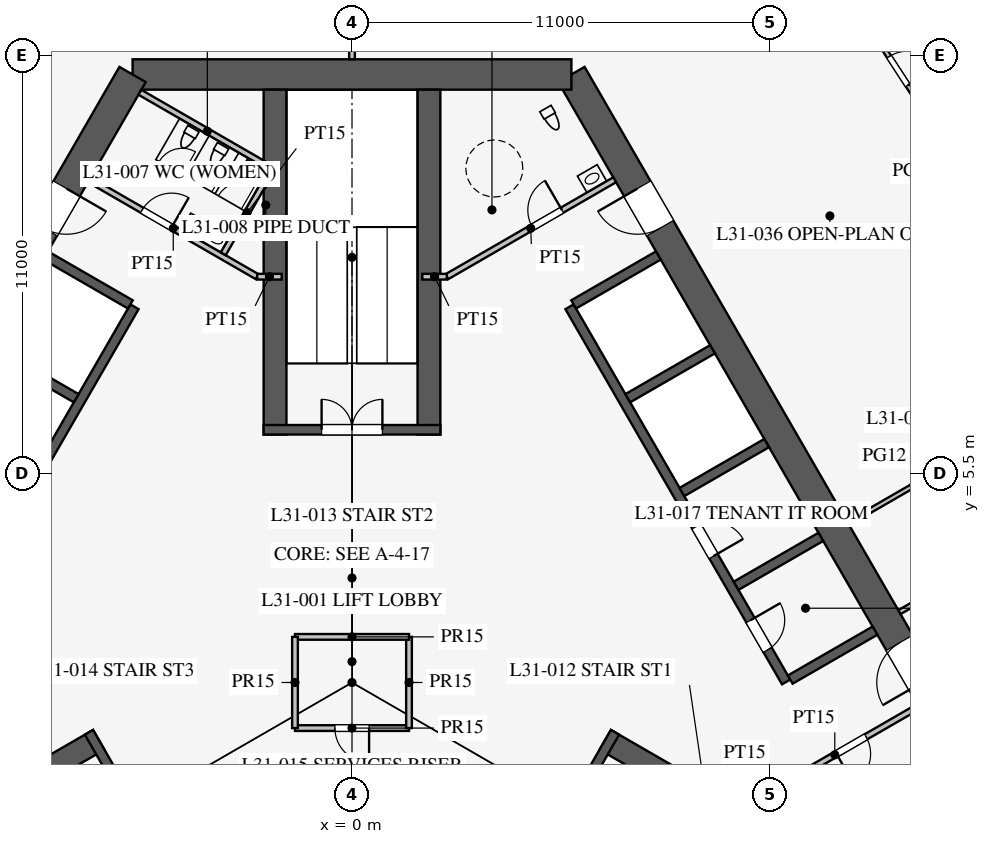
"""IFC4 building model, lengths in metres.
Left out: names, types, materials, properties, quantities, classifications, styles, units other than length and angle.
Written with IfcOpenShell. Run it as: python <this file> out.ifc"""

import sys

from ifc_helpers import new_model, si_unit, direction, frame, frame_2d, origin, place, context, subcontext, project, spatial, rectangle, extrude, element, fill, save


model = new_model("IFC4")
c1 = context("Model", 3, precision=1e-05, world=origin(), true_north=direction((0.0, 1.0)))
c2 = subcontext(c1, "Body", "Model", "MODEL_VIEW")
j1 = project(units=[si_unit("LENGTHUNIT", "METRE"), si_unit("PLANEANGLEUNIT", "RADIAN")], contexts=[c1])
p1 = place(None, origin())
s1 = spatial("IfcSite", under=j1, at=p1, CompositionType="ELEMENT")
p2 = place(p1, origin())
s2 = spatial("IfcBuilding", under=s1, at=p2, CompositionType="ELEMENT")
p3 = place(p2, frame((0.0, 0.0, 136.7)))
s3 = spatial("IfcBuildingStorey", under=s2, at=p3, CompositionType="ELEMENT", Elevation=136.7)
p4 = place(p3, frame((16.743, -3.0, 0.0), z_axis=(0.0, 0.0, 1.0), x_axis=(-0.500002442456, 0.866023993627, 0.0)))
e1 = element("IfcWall", 1, at=p4, inside=s3, PredefinedType="SHEAR", context=c2, shape_type="SweptSolid", body=[
    extrude(rectangle(XDim=21.939, YDim=0.8, at=frame_2d((10.97, 0.0))), origin(), (0.0, 0.0, 1.0), 4.2),
])
p5 = place(p4, frame((17.27, 0.0, 0.0)))
e2 = element("IfcOpeningElement", 2, at=p5, cuts=e1, PredefinedType="OPENING", context=c2, shape_type="SweptSolid", body=[
    extrude(rectangle(XDim=1.2, YDim=2.1, at=frame_2d((0.6, 1.05))), frame((0.0, 0.41, 0.0), z_axis=(0.0, -1.0, 0.0), x_axis=(1.0, 0.0, 0.0)), (0.0, 0.0, 1.0), 0.82),
])
p6 = place(p4, frame((3.47, 0.0, 0.0)))
e3 = element("IfcOpeningElement", 3, at=p6, cuts=e1, PredefinedType="OPENING", context=c2, shape_type="SweptSolid", body=[
    extrude(rectangle(XDim=1.2, YDim=2.1, at=frame_2d((0.6, 1.05))), frame((0.0, 0.41, 0.0), z_axis=(0.0, -1.0, 0.0), x_axis=(1.0, 0.0, 0.0)), (0.0, 0.0, 1.0), 0.82),
])
p7 = place(p3, frame((5.773, 16.0, 0.0), z_axis=(0.0, 0.0, 1.0), x_axis=(-1.0, 0.0, 0.0)))
e4 = element("IfcWall", 4, at=p7, inside=s3, PredefinedType="SHEAR", context=c2, shape_type="SweptSolid", body=[
    extrude(rectangle(XDim=11.547, YDim=0.8, at=frame_2d((5.773, 0.0))), origin(), (0.0, 0.0, 1.0), 4.2),
])
p8 = place(p3, frame((-5.773, 16.0, 0.0), z_axis=(0.0, 0.0, 1.0), x_axis=(-0.500002442456, -0.866023993627, 0.0)))
e5 = element("IfcWall", 5, at=p8, inside=s3, PredefinedType="SHEAR", context=c2, shape_type="SweptSolid", body=[
    extrude(rectangle(XDim=21.939, YDim=0.8, at=frame_2d((10.97, 0.0))), origin(), (0.0, 0.0, 1.0), 4.2),
])
p9 = place(p8, frame((17.27, 0.0, 0.0)))
e6 = element("IfcOpeningElement", 6, at=p9, cuts=e5, PredefinedType="OPENING", context=c2, shape_type="SweptSolid", body=[
    extrude(rectangle(XDim=1.2, YDim=2.1, at=frame_2d((0.6, 1.05))), frame((0.0, 0.41, 0.0), z_axis=(0.0, -1.0, 0.0), x_axis=(1.0, 0.0, 0.0)), (0.0, 0.0, 1.0), 0.82),
])
p10 = place(p8, frame((3.47, 0.0, 0.0)))
e7 = element("IfcOpeningElement", 7, at=p10, cuts=e5, PredefinedType="OPENING", context=c2, shape_type="SweptSolid", body=[
    extrude(rectangle(XDim=1.2, YDim=2.1, at=frame_2d((0.6, 1.05))), frame((0.0, 0.41, 0.0), z_axis=(0.0, -1.0, 0.0), x_axis=(1.0, 0.0, 0.0)), (0.0, 0.0, 1.0), 0.82),
])
p11 = place(p3, frame((11.424, 0.014, 0.0), z_axis=(0.0, 0.0, 1.0), x_axis=(-0.500001763848, 0.866024385424, 0.0)))
e8 = element("IfcWall", 8, at=p11, inside=s3, PredefinedType="SHEAR", context=c2, shape_type="SweptSolid", body=[
    extrude(rectangle(XDim=11.4, YDim=0.25, at=frame_2d((5.7, 0.0))), origin(), (0.0, 0.0, 1.0), 4.2),
])
p12 = place(p11, frame((0.975, 0.0, 0.0)))
e9 = element("IfcOpeningElement", 9, at=p12, cuts=e8, PredefinedType="OPENING", context=c2, shape_type="SweptSolid", body=[
    extrude(rectangle(XDim=0.9, YDim=2.1, at=frame_2d((0.45, 1.05))), frame((0.0, 0.135, 0.0), z_axis=(0.0, -1.0, 0.0), x_axis=(1.0, 0.0, 0.0)), (0.0, 0.0, 1.0), 0.27),
])
p13 = place(p11, frame((3.825, 0.0, 0.0)))
e10 = element("IfcOpeningElement", 10, at=p13, cuts=e8, PredefinedType="OPENING", context=c2, shape_type="SweptSolid", body=[
    extrude(rectangle(XDim=0.9, YDim=2.1, at=frame_2d((0.45, 1.05))), frame((0.0, 0.135, 0.0), z_axis=(0.0, -1.0, 0.0), x_axis=(1.0, 0.0, 0.0)), (0.0, 0.0, 1.0), 0.27),
])
for number, where, z_axis, x_axis in (
    (11, (11.532, 0.076, 0.0), (0.0, 0.0, 1.0), (0.866, 0.5, 0.0)),
    (12, (10.107, 2.544, 0.0), (0.0, 0.0, 1.0), (0.866, 0.5, 0.0)),
    (13, (8.682, 5.012, 0.0), (0.0, 0.0, 1.0), (0.866, 0.5, 0.0)),
    (14, (7.257, 7.481, 0.0), (0.0, 0.0, 1.0), (0.866, 0.5, 0.0)),
):
    element("IfcWall", number, at=place(p3, frame(where, z_axis=z_axis, x_axis=x_axis)), inside=s3, PredefinedType="SHEAR", context=c2, shape_type="SweptSolid", body=[
        extrude(rectangle(XDim=2.575, YDim=0.25, at=frame_2d((1.288, 0.0))), origin(), (0.0, 0.0, 1.0), 4.2),
    ])
p14 = place(p3, frame((5.832, 9.949, 0.0), z_axis=(0.0, 0.0, 1.0), x_axis=(0.866029291668, 0.499993265928, 0.0)))
e15 = element("IfcWall", 15, at=p14, inside=s3, PredefinedType="SHEAR", context=c2, shape_type="SweptSolid", body=[
    extrude(rectangle(XDim=2.575, YDim=0.25, at=frame_2d((1.288, 0.0))), origin(), (0.0, 0.0, 1.0), 4.2),
])
p15 = place(p3, frame((-5.724, 9.886, 0.0), z_axis=(0.0, 0.0, 1.0), x_axis=(-0.500001763848, -0.866024385424, 0.0)))
e16 = element("IfcWall", 16, at=p15, inside=s3, PredefinedType="SHEAR", context=c2, shape_type="SweptSolid", body=[
    extrude(rectangle(XDim=11.4, YDim=0.25, at=frame_2d((5.7, 0.0))), origin(), (0.0, 0.0, 1.0), 4.2),
])
p16 = place(p15, frame((6.525, 0.0, 0.0)))
e17 = element("IfcOpeningElement", 17, at=p16, cuts=e16, PredefinedType="OPENING", context=c2, shape_type="SweptSolid", body=[
    extrude(rectangle(XDim=1.2, YDim=2.2, at=frame_2d((0.6, 1.1))), frame((0.0, 0.135, 0.0), z_axis=(0.0, -1.0, 0.0), x_axis=(1.0, 0.0, 0.0)), (0.0, 0.0, 1.0), 0.27),
])
p17 = place(p15, frame((9.375, 0.0, 0.0)))
e18 = element("IfcOpeningElement", 18, at=p17, cuts=e16, PredefinedType="OPENING", context=c2, shape_type="SweptSolid", body=[
    extrude(rectangle(XDim=1.2, YDim=2.2, at=frame_2d((0.6, 1.1))), frame((0.0, 0.135, 0.0), z_axis=(0.0, -1.0, 0.0), x_axis=(1.0, 0.0, 0.0)), (0.0, 0.0, 1.0), 0.27),
])
p18 = place(p3, frame((-5.832, 9.949, 0.0), z_axis=(0.0, 0.0, 1.0), x_axis=(-0.866029291668, 0.499993265928, 0.0)))
e19 = element("IfcWall", 19, at=p18, inside=s3, PredefinedType="SHEAR", context=c2, shape_type="SweptSolid", body=[
    extrude(rectangle(XDim=2.575, YDim=0.25, at=frame_2d((1.288, 0.0))), origin(), (0.0, 0.0, 1.0), 4.2),
])
p19 = place(p3, frame((-7.257, 7.481, 0.0), z_axis=(0.0, 0.0, 1.0), x_axis=(-0.866046643894, 0.499963209246, 0.0)))
e20 = element("IfcWall", 20, at=p19, inside=s3, PredefinedType="SHEAR", context=c2, shape_type="SweptSolid", body=[
    extrude(rectangle(XDim=2.575, YDim=0.25, at=frame_2d((1.288, 0.0))), origin(), (0.0, 0.0, 1.0), 4.2),
])
p20 = place(p3, frame((6.663, -1.509, 0.0), z_axis=(0.0, 0.0, 1.0), x_axis=(0.866019375473, -0.500010441196, 0.0)))
e21 = element("IfcWall", 21, at=p20, inside=s3, PredefinedType="SHEAR", context=c2, shape_type="SweptSolid", body=[
    extrude(rectangle(XDim=9.075, YDim=0.6, at=frame_2d((4.538, 0.0))), origin(), (0.0, 0.0, 1.0), 4.2),
])
p21 = place(p3, frame((4.597, -5.339, 0.0), z_axis=(0.0, 0.0, 1.0), x_axis=(0.499984536904, 0.866034331223, 0.0)))
e22 = element("IfcWall", 22, at=p21, inside=s3, PredefinedType="SHEAR", context=c2, shape_type="SweptSolid", body=[
    extrude(rectangle(XDim=4.65, YDim=0.25, at=frame_2d((2.325, 0.0))), origin(), (0.0, 0.0, 1.0), 4.2),
])
p22 = place(p21, frame((1.525, 0.0, 0.0)))
e23 = element("IfcOpeningElement", 23, at=p22, cuts=e22, PredefinedType="OPENING", context=c2, shape_type="SweptSolid", body=[
    extrude(rectangle(XDim=1.6, YDim=2.1, at=frame_2d((0.8, 1.05))), frame((0.0, 0.135, 0.0), z_axis=(0.0, -1.0, 0.0), x_axis=(1.0, 0.0, 0.0)), (0.0, 0.0, 1.0), 0.27),
])
for number, where, z_axis, x_axis in (
    (24, (2.025, 6.525, 0.0), (0.0, 0.0, 1.0), (0.0, 1.0, 0.0)),
    (25, (-2.025, 6.525, 0.0), (0.0, 0.0, 1.0), (0.0, 1.0, 0.0)),
):
    element("IfcWall", number, at=place(p3, frame(where, z_axis=z_axis, x_axis=x_axis)), inside=s3, PredefinedType="SHEAR", context=c2, shape_type="SweptSolid", body=[
        extrude(rectangle(XDim=9.075, YDim=0.6, at=frame_2d((4.538, 0.0))), origin(), (0.0, 0.0, 1.0), 4.2),
    ])
p23 = place(p3, frame((2.325, 6.65, 0.0), z_axis=(0.0, 0.0, 1.0), x_axis=(-1.0, 0.0, 0.0)))
e26 = element("IfcWall", 26, at=p23, inside=s3, PredefinedType="SHEAR", context=c2, shape_type="SweptSolid", body=[
    extrude(rectangle(XDim=4.65, YDim=0.25, at=frame_2d((2.325, 0.0))), origin(), (0.0, 0.0, 1.0), 4.2),
])
p24 = place(p23, frame((1.525, 0.0, 0.0)))
e27 = element("IfcOpeningElement", 27, at=p24, cuts=e26, PredefinedType="OPENING", context=c2, shape_type="SweptSolid", body=[
    extrude(rectangle(XDim=1.6, YDim=2.1, at=frame_2d((0.8, 1.05))), frame((0.0, 0.135, 0.0), z_axis=(0.0, -1.0, 0.0), x_axis=(1.0, 0.0, 0.0)), (0.0, 0.0, 1.0), 0.27),
])
p25 = place(p3, frame((-6.663, -1.509, 0.0), z_axis=(0.0, 0.0, 1.0), x_axis=(-0.866019375473, -0.500010441196, 0.0)))
e28 = element("IfcWall", 28, at=p25, inside=s3, PredefinedType="SHEAR", context=c2, shape_type="SweptSolid", body=[
    extrude(rectangle(XDim=9.075, YDim=0.6, at=frame_2d((4.538, 0.0))), origin(), (0.0, 0.0, 1.0), 4.2),
])
p26 = place(p3, frame((-6.922, -1.312, 0.0), z_axis=(0.0, 0.0, 1.0), x_axis=(0.499984536904, -0.866034331223, 0.0)))
e29 = element("IfcWall", 29, at=p26, inside=s3, PredefinedType="SHEAR", context=c2, shape_type="SweptSolid", body=[
    extrude(rectangle(XDim=4.65, YDim=0.25, at=frame_2d((2.325, 0.0))), origin(), (0.0, 0.0, 1.0), 4.2),
])
p27 = place(p26, frame((1.525, 0.0, 0.0)))
e30 = element("IfcOpeningElement", 30, at=p27, cuts=e29, PredefinedType="OPENING", context=c2, shape_type="SweptSolid", body=[
    extrude(rectangle(XDim=1.6, YDim=2.1, at=frame_2d((0.8, 1.05))), frame((0.0, 0.135, 0.0), z_axis=(0.0, -1.0, 0.0), x_axis=(1.0, 0.0, 0.0)), (0.0, 0.0, 1.0), 0.27),
])
p28 = place(p3, frame((2.495, 10.678, 0.0), z_axis=(0.0, 0.0, 1.0), x_axis=(0.86602216432, 0.500005610874, 0.0)))
e31 = element("IfcWall", 31, at=p28, inside=s3, PredefinedType="PARTITIONING", context=c2, shape_type="SweptSolid", body=[
    extrude(rectangle(XDim=5.1, YDim=0.15, at=frame_2d((2.55, 0.0))), origin(), (0.0, 0.0, 1.0), 4.0),
])
p29 = place(p28, frame((2.6, 0.0, 0.0)))
e32 = element("IfcOpeningElement", 32, at=p29, cuts=e31, PredefinedType="OPENING", context=c2, shape_type="SweptSolid", body=[
    extrude(rectangle(XDim=0.9, YDim=2.1, at=frame_2d((0.45, 1.05))), frame((0.0, 0.085, 0.0), z_axis=(0.0, -1.0, 0.0), x_axis=(1.0, 0.0, 0.0)), (0.0, 0.0, 1.0), 0.17),
])
p30 = place(p3, frame((10.495, -3.178, 0.0), z_axis=(0.0, 0.0, 1.0), x_axis=(0.86602216432, 0.500005610874, 0.0)))
e33 = element("IfcWall", 33, at=p30, inside=s3, PredefinedType="PARTITIONING", context=c2, shape_type="SweptSolid", body=[
    extrude(rectangle(XDim=5.1, YDim=0.15, at=frame_2d((2.55, 0.0))), origin(), (0.0, 0.0, 1.0), 4.0),
])
p31 = place(p30, frame((2.6, 0.0, 0.0)))
e34 = element("IfcOpeningElement", 34, at=p31, cuts=e33, PredefinedType="OPENING", context=c2, shape_type="SweptSolid", body=[
    extrude(rectangle(XDim=0.9, YDim=2.1, at=frame_2d((0.45, 1.05))), frame((0.0, 0.085, 0.0), z_axis=(0.0, -1.0, 0.0), x_axis=(1.0, 0.0, 0.0)), (0.0, 0.0, 1.0), 0.17),
])
p32 = place(p3, frame((-2.495, 10.678, 0.0), z_axis=(0.0, 0.0, 1.0), x_axis=(-0.86602216432, 0.500005610874, 0.0)))
e35 = element("IfcWall", 35, at=p32, inside=s3, PredefinedType="PARTITIONING", context=c2, shape_type="SweptSolid", body=[
    extrude(rectangle(XDim=5.1, YDim=0.15, at=frame_2d((2.55, 0.0))), origin(), (0.0, 0.0, 1.0), 4.0),
])
p33 = place(p32, frame((2.6, 0.0, 0.0)))
e36 = element("IfcOpeningElement", 36, at=p33, cuts=e35, PredefinedType="OPENING", context=c2, shape_type="SweptSolid", body=[
    extrude(rectangle(XDim=0.9, YDim=2.1, at=frame_2d((0.45, 1.05))), frame((0.0, 0.085, 0.0), z_axis=(0.0, -1.0, 0.0), x_axis=(1.0, 0.0, 0.0)), (0.0, 0.0, 1.0), 0.17),
])
for number, where, z_axis, x_axis in (
    (37, (2.495, 10.678, 0.0), (0.0, 0.0, 1.0), (-1.0, 0.0, 0.0)),
    (38, (-2.495, 10.678, 0.0), (0.0, 0.0, 1.0), (1.0, 0.0, 0.0)),
):
    element("IfcWall", number, at=place(p3, frame(where, z_axis=z_axis, x_axis=x_axis)), inside=s3, PredefinedType="PARTITIONING", context=c2, shape_type="SweptSolid", body=[
        extrude(rectangle(XDim=0.645, YDim=0.15, at=frame_2d((0.323, 0.0))), origin(), (0.0, 0.0, 1.0), 4.0),
    ])
p34 = place(p3, frame((-2.031, 13.482, 0.0), z_axis=(0.0, 0.0, 1.0), x_axis=(-0.866050731258, 0.499956128963, 0.0)))
e39 = element("IfcWall", 39, at=p34, inside=s3, PredefinedType="PARTITIONING", context=c2, shape_type="SweptSolid", body=[
    extrude(rectangle(XDim=4.1, YDim=0.15, at=frame_2d((2.05, 0.0))), origin(), (0.0, 0.0, 1.0), 4.0),
])
p35 = place(p3, frame((-3.389, 11.281, 0.0), z_axis=(0.0, 0.0, 1.0), x_axis=(0.499989096993, 0.866031698547, 0.0)))
e40 = element("IfcWall", 40, at=p35, inside=s3, PredefinedType="PARTITIONING", context=c2, shape_type="SweptSolid", body=[
    extrude(rectangle(XDim=2.51, YDim=0.15, at=frame_2d((1.255, 0.0))), origin(), (0.0, 0.0, 1.0), 4.0),
])
p36 = place(p3, frame((-1.5, -1.2, 0.0), z_axis=(0.0, 0.0, 1.0), x_axis=(1.0, 0.0, 0.0)))
e41 = element("IfcWall", 41, at=p36, inside=s3, PredefinedType="PARTITIONING", context=c2, shape_type="SweptSolid", body=[
    extrude(rectangle(XDim=3.0, YDim=0.15, at=frame_2d((1.5, 0.0))), origin(), (0.0, 0.0, 1.0), 4.0),
])
p37 = place(p36, frame((1.05, 0.0, 0.0)))
e42 = element("IfcOpeningElement", 42, at=p37, cuts=e41, PredefinedType="OPENING", context=c2, shape_type="SweptSolid", body=[
    extrude(rectangle(XDim=0.9, YDim=2.1, at=frame_2d((0.45, 1.05))), frame((0.0, 0.085, 0.0), z_axis=(0.0, -1.0, 0.0), x_axis=(1.0, 0.0, 0.0)), (0.0, 0.0, 1.0), 0.17),
])
p38 = place(p3, frame((1.5, -1.2, 0.0), z_axis=(0.0, 0.0, 1.0), x_axis=(0.0, 1.0, 0.0)))
e43 = element("IfcWall", 43, at=p38, inside=s3, PredefinedType="PARTITIONING", context=c2, shape_type="SweptSolid", body=[
    extrude(rectangle(XDim=2.4, YDim=0.15, at=frame_2d((1.2, 0.0))), origin(), (0.0, 0.0, 1.0), 4.0),
])
p39 = place(p3, frame((1.5, 1.2, 0.0), z_axis=(0.0, 0.0, 1.0), x_axis=(-1.0, 0.0, 0.0)))
e44 = element("IfcWall", 44, at=p39, inside=s3, PredefinedType="PARTITIONING", context=c2, shape_type="SweptSolid", body=[
    extrude(rectangle(XDim=3.0, YDim=0.15, at=frame_2d((1.5, 0.0))), origin(), (0.0, 0.0, 1.0), 4.0),
])
p40 = place(p3, frame((-1.5, 1.2, 0.0), z_axis=(0.0, 0.0, 1.0), x_axis=(0.0, -1.0, 0.0)))
e45 = element("IfcWall", 45, at=p40, inside=s3, PredefinedType="PARTITIONING", context=c2, shape_type="SweptSolid", body=[
    extrude(rectangle(XDim=2.4, YDim=0.15, at=frame_2d((1.2, 0.0))), origin(), (0.0, 0.0, 1.0), 4.0),
])
p41 = place(p3, frame((0.0, 16.4, 0.0), z_axis=(0.0, 0.0, 1.0), x_axis=(0.0, 1.0, 0.0)))
e46 = element("IfcWall", 46, at=p41, inside=s3, PredefinedType="PARTITIONING", context=c2, shape_type="SweptSolid", body=[
    extrude(rectangle(XDim=16.65, YDim=0.15, at=frame_2d((8.325, 0.0))), origin(), (0.0, 0.0, 1.0), 2.3),
])
for number, where, z_axis, x_axis in (
    (47, (13.055, 4.188, 0.0), (0.0, 0.0, 1.0), (0.866, 0.5, 0.0)),
    (48, (14.405, 1.85, 0.0), (0.0, 0.0, 1.0), (0.866, 0.5, 0.0)),
):
    element("IfcWall", number, at=place(p3, frame(where, z_axis=z_axis, x_axis=x_axis)), inside=s3, PredefinedType="PARTITIONING", context=c2, shape_type="SweptSolid", body=[
        extrude(rectangle(XDim=4.0, YDim=0.12, at=frame_2d((2.0, 0.0))), origin(), (0.0, 0.0, 1.0), 2.9),
    ])
p42 = place(p3, frame((15.606, 14.206, 0.0), z_axis=(0.0, 0.0, 1.0), x_axis=(-0.546069464151, 0.837739900161, 0.0)))
e49 = element("IfcWall", 49, at=p42, inside=s3, PredefinedType="PARTITIONING", context=c2, shape_type="SweptSolid", body=[
    extrude(rectangle(XDim=4.507, YDim=0.12, at=frame_2d((2.253, 0.0))), origin(), (0.0, 0.0, 1.0), 2.9),
])
p43 = place(p42, frame((1.8, 0.0, 0.15)))
e50 = element("IfcOpeningElement", 50, at=p43, cuts=e49, PredefinedType="OPENING", context=c2, shape_type="SweptSolid", body=[
    extrude(rectangle(XDim=0.9, YDim=2.1, at=frame_2d((0.45, 1.05))), frame((0.0, 0.07, 0.0), z_axis=(0.0, -1.0, 0.0), x_axis=(1.0, 0.0, 0.0)), (0.0, 0.0, 1.0), 0.14),
])
p44 = place(p3, frame((-0.016, 30.491, 0.0), z_axis=(0.0, 0.0, 1.0), x_axis=(-0.50000091641, -0.866024874695, 0.0)))
e51 = element("IfcWall", 51, at=p44, inside=s3, PredefinedType="PARTITIONING", context=c2, shape_type="SweptSolid", body=[
    extrude(rectangle(XDim=52.796, YDim=0.12, at=frame_2d((26.398, 0.0))), origin(), (0.0, 0.0, 1.0), 2.9),
])
p45 = place(p44, frame((10.2, 0.0, 0.15)))
e52 = element("IfcOpeningElement", 52, at=p45, cuts=e51, PredefinedType="OPENING", context=c2, shape_type="SweptSolid", body=[
    extrude(rectangle(XDim=1.8, YDim=2.1, at=frame_2d((0.9, 1.05))), frame((0.0, 0.07, 0.0), z_axis=(0.0, -1.0, 0.0), x_axis=(1.0, 0.0, 0.0)), (0.0, 0.0, 1.0), 0.14),
])
p46 = place(p44, frame((40.8, 0.0, 0.15)))
e53 = element("IfcOpeningElement", 53, at=p46, cuts=e51, PredefinedType="OPENING", context=c2, shape_type="SweptSolid", body=[
    extrude(rectangle(XDim=1.8, YDim=2.1, at=frame_2d((0.9, 1.05))), frame((0.0, 0.07, 0.0), z_axis=(0.0, -1.0, 0.0), x_axis=(1.0, 0.0, 0.0)), (0.0, 0.0, 1.0), 0.14),
])
p47 = place(p29, origin())
e54 = element("IfcDoor", 54, at=p47, inside=s3, OperationType="SINGLE_SWING_RIGHT", PredefinedType="DOOR", context=c2, shape_type="SweptSolid", body=[
    extrude(rectangle(XDim=0.9, YDim=2.1, at=frame_2d((0.45, 1.05))), frame((0.0, 0.025, 0.0), z_axis=(0.0, -1.0, 0.0), x_axis=(1.0, 0.0, 0.0)), (0.0, 0.0, 1.0), 0.05),
])
fill(e32, e54)
p48 = place(p31, frame((0.9, 0.0, 0.0), z_axis=(0.0, 0.0, 1.0), x_axis=(-1.0, 0.0, 0.0)))
e55 = element("IfcDoor", 55, at=p48, inside=s3, OperationType="SINGLE_SWING_RIGHT", PredefinedType="DOOR", context=c2, shape_type="SweptSolid", body=[
    extrude(rectangle(XDim=0.9, YDim=2.1, at=frame_2d((0.45, 1.05))), frame((0.0, 0.025, 0.0), z_axis=(0.0, -1.0, 0.0), x_axis=(1.0, 0.0, 0.0)), (0.0, 0.0, 1.0), 0.05),
])
fill(e34, e55)
p49 = place(p33, frame((0.9, 0.0, 0.0), z_axis=(0.0, 0.0, 1.0), x_axis=(-1.0, 0.0, 0.0)))
e56 = element("IfcDoor", 56, at=p49, inside=s3, OperationType="SINGLE_SWING_RIGHT", PredefinedType="DOOR", context=c2, shape_type="SweptSolid", body=[
    extrude(rectangle(XDim=0.9, YDim=2.1, at=frame_2d((0.45, 1.05))), frame((0.0, 0.025, 0.0), z_axis=(0.0, -1.0, 0.0), x_axis=(1.0, 0.0, 0.0)), (0.0, 0.0, 1.0), 0.05),
])
fill(e36, e56)
p50 = place(p37, frame((0.9, 0.0, 0.0), z_axis=(0.0, 0.0, 1.0), x_axis=(-1.0, 0.0, 0.0)))
e57 = element("IfcDoor", 57, at=p50, inside=s3, OperationType="SINGLE_SWING_LEFT", PredefinedType="DOOR", context=c2, shape_type="SweptSolid", body=[
    extrude(rectangle(XDim=0.9, YDim=2.1, at=frame_2d((0.45, 1.05))), frame((0.0, 0.025, 0.0), z_axis=(0.0, -1.0, 0.0), x_axis=(1.0, 0.0, 0.0)), (0.0, 0.0, 1.0), 0.05),
])
fill(e42, e57)
p51 = place(p24, frame((1.6, 0.0, 0.0), z_axis=(0.0, 0.0, 1.0), x_axis=(-1.0, 0.0, 0.0)))
e58 = element("IfcDoor", 58, at=p51, inside=s3, OperationType="DOUBLE_DOOR_SINGLE_SWING", PredefinedType="DOOR", context=c2, shape_type="SweptSolid", body=[
    extrude(rectangle(XDim=1.6, YDim=2.1, at=frame_2d((0.8, 1.05))), frame((0.0, 0.025, 0.0), z_axis=(0.0, -1.0, 0.0), x_axis=(1.0, 0.0, 0.0)), (0.0, 0.0, 1.0), 0.05),
])
fill(e27, e58)
p52 = place(p5, origin())
e59 = element("IfcDoor", 59, at=p52, inside=s3, OperationType="SINGLE_SWING_RIGHT", PredefinedType="DOOR", context=c2, shape_type="SweptSolid", body=[
    extrude(rectangle(XDim=1.2, YDim=2.1, at=frame_2d((0.6, 1.05))), frame((0.0, 0.025, 0.0), z_axis=(0.0, -1.0, 0.0), x_axis=(1.0, 0.0, 0.0)), (0.0, 0.0, 1.0), 0.05),
])
fill(e2, e59)
p53 = place(p6, origin())
e60 = element("IfcDoor", 60, at=p53, inside=s3, OperationType="SINGLE_SWING_LEFT", PredefinedType="DOOR", context=c2, shape_type="SweptSolid", body=[
    extrude(rectangle(XDim=1.2, YDim=2.1, at=frame_2d((0.6, 1.05))), frame((0.0, 0.025, 0.0), z_axis=(0.0, -1.0, 0.0), x_axis=(1.0, 0.0, 0.0)), (0.0, 0.0, 1.0), 0.05),
])
fill(e3, e60)
p54 = place(p10, origin())
e61 = element("IfcDoor", 61, at=p54, inside=s3, OperationType="SINGLE_SWING_LEFT", PredefinedType="DOOR", context=c2, shape_type="SweptSolid", body=[
    extrude(rectangle(XDim=1.2, YDim=2.1, at=frame_2d((0.6, 1.05))), frame((0.0, 0.025, 0.0), z_axis=(0.0, -1.0, 0.0), x_axis=(1.0, 0.0, 0.0)), (0.0, 0.0, 1.0), 0.05),
])
fill(e7, e61)
p55 = place(p12, frame((0.9, 0.0, 0.0), z_axis=(0.0, 0.0, 1.0), x_axis=(-1.0, 0.0, 0.0)))
e62 = element("IfcDoor", 62, at=p55, inside=s3, OperationType="SINGLE_SWING_LEFT", PredefinedType="DOOR", context=c2, shape_type="SweptSolid", body=[
    extrude(rectangle(XDim=0.9, YDim=2.1, at=frame_2d((0.45, 1.05))), frame((0.0, 0.025, 0.0), z_axis=(0.0, -1.0, 0.0), x_axis=(1.0, 0.0, 0.0)), (0.0, 0.0, 1.0), 0.05),
])
fill(e9, e62)
p56 = place(p13, frame((0.9, 0.0, 0.0), z_axis=(0.0, 0.0, 1.0), x_axis=(-1.0, 0.0, 0.0)))
e63 = element("IfcDoor", 63, at=p56, inside=s3, OperationType="SINGLE_SWING_RIGHT", PredefinedType="DOOR", context=c2, shape_type="SweptSolid", body=[
    extrude(rectangle(XDim=0.9, YDim=2.1, at=frame_2d((0.45, 1.05))), frame((0.0, 0.025, 0.0), z_axis=(0.0, -1.0, 0.0), x_axis=(1.0, 0.0, 0.0)), (0.0, 0.0, 1.0), 0.05),
])
fill(e10, e63)
p57 = place(p43, frame((0.9, 0.0, 0.0), z_axis=(0.0, 0.0, 1.0), x_axis=(-1.0, 0.0, 0.0)))
e64 = element("IfcDoor", 64, at=p57, inside=s3, OperationType="SINGLE_SWING_RIGHT", PredefinedType="DOOR", context=c2, shape_type="SweptSolid", body=[
    extrude(rectangle(XDim=0.9, YDim=2.1, at=frame_2d((0.45, 1.05))), frame((0.0, 0.025, 0.0), z_axis=(0.0, -1.0, 0.0), x_axis=(1.0, 0.0, 0.0)), (0.0, 0.0, 1.0), 0.05),
])
fill(e50, e64)
save(model, sys.argv[1])
